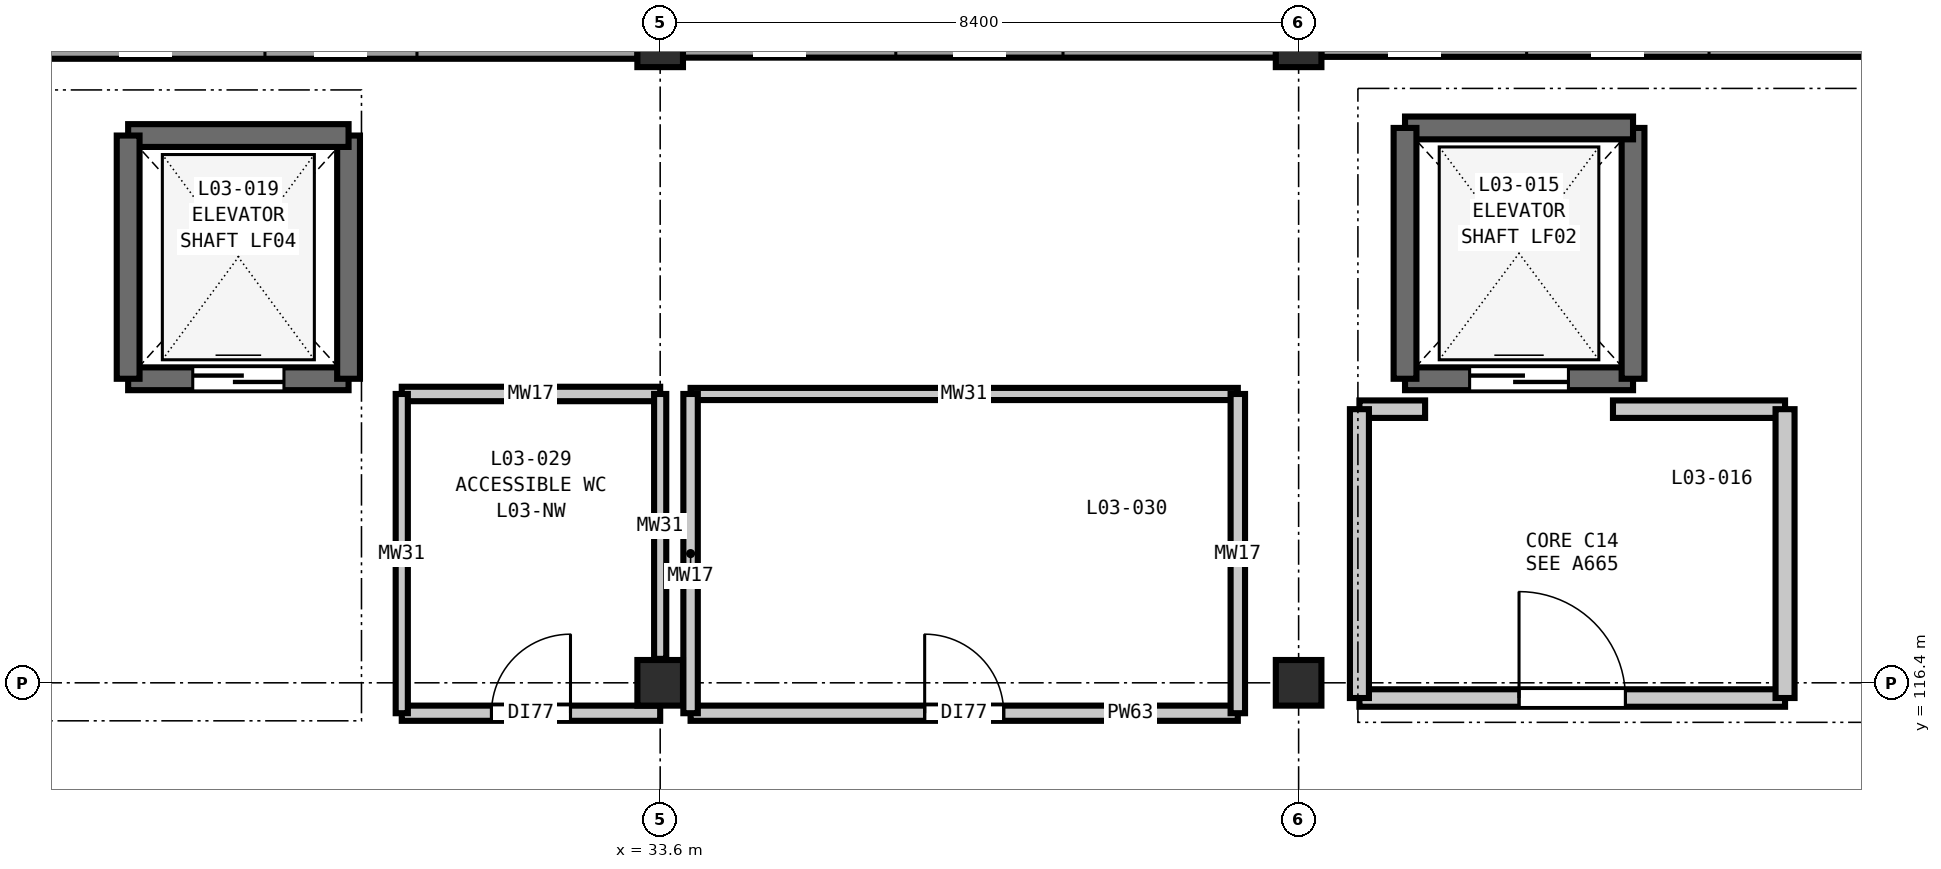
"""IFC4 building model, lengths in metres.
Left out: names, types, materials, properties, quantities, classifications, styles, units other than length and angle.
Written with IfcOpenShell. Run it as: python <this file> out.ifc"""

import sys

from ifc_helpers import new_model, si_unit, direction, frame, frame_2d, origin, origin_2d, place, context, subcontext, project, spatial, rectangle, extrude, element, fill, save


model = new_model("IFC4")
c1 = context("Model", 3, precision=1e-05, world=origin(), true_north=direction((0.0, 1.0)))
c2 = subcontext(c1, "Body", "Model", "MODEL_VIEW")
j1 = project(units=[si_unit("LENGTHUNIT", "METRE"), si_unit("PLANEANGLEUNIT", "RADIAN")], contexts=[c1])
p1 = place(None, origin())
s1 = spatial("IfcSite", under=j1, at=p1, CompositionType="ELEMENT")
p2 = place(p1, origin())
s2 = spatial("IfcBuilding", under=s1, at=p2, CompositionType="ELEMENT")
p3 = place(p2, frame((0.0, 0.0, 16.2)))
s3 = spatial("IfcBuildingStorey", under=s2, at=p3, CompositionType="ELEMENT", Elevation=16.2)
for number, where, z_axis, x_axis in (
    (1, (33.6, 116.4, 0.0), (0.0, 0.0, 1.0), (1.0, 0.0, 0.0)),
    (2, (33.6, 124.8, 0.0), (0.0, 0.0, 1.0), (1.0, 0.0, 0.0)),
    (3, (42.0, 116.4, 0.0), (0.0, 0.0, 1.0), (1.0, 0.0, 0.0)),
    (4, (42.0, 124.8, 0.0), (0.0, 0.0, 1.0), (1.0, 0.0, 0.0)),
):
    element("IfcColumn", number, at=place(p3, frame(where, z_axis=z_axis, x_axis=x_axis)), inside=s3, PredefinedType="COLUMN", context=c2, shape_type="SweptSolid", body=[
        extrude(rectangle(XDim=0.6, YDim=0.6, at=origin_2d()), origin(), (0.0, 0.0, 1.0), 4.2),
    ])
p4 = place(p3, frame((25.498, 124.8, 0.0), z_axis=(0.0, 0.0, 1.0), x_axis=(1.0, 0.0, 0.0)))
e5 = element("IfcWall", 5, at=p4, inside=s3, PredefinedType="SOLIDWALL", context=c2, shape_type="SweptSolid", body=[
    extrude(rectangle(XDim=7.804, YDim=0.38, at=frame_2d((3.902, 0.0))), origin(), (0.0, 0.0, 1.0), 3.48),
])
p5 = place(p4, frame((2.902, 0.0, 0.9)))
e6 = element("IfcOpeningElement", 6, at=p5, cuts=e5, PredefinedType="OPENING", context=c2, shape_type="SweptSolid", body=[
    extrude(rectangle(XDim=2.0, YDim=1.95, at=frame_2d((1.0, 0.975))), frame((0.0, 0.2, 0.0), z_axis=(0.0, -1.0, 0.0), x_axis=(1.0, 0.0, 0.0)), (0.0, 0.0, 1.0), 0.4),
])
p6 = place(p3, frame((33.898, 124.8, 0.0), z_axis=(0.0, 0.0, 1.0), x_axis=(1.0, 0.0, 0.0)))
e7 = element("IfcWall", 7, at=p6, inside=s3, PredefinedType="SOLIDWALL", context=c2, shape_type="SweptSolid", body=[
    extrude(rectangle(XDim=7.804, YDim=0.35, at=frame_2d((3.902, 0.0))), origin(), (0.0, 0.0, 1.0), 3.48),
])
p7 = place(p6, frame((2.802, 0.0, 0.9)))
e8 = element("IfcOpeningElement", 8, at=p7, cuts=e7, PredefinedType="OPENING", context=c2, shape_type="SweptSolid", body=[
    extrude(rectangle(XDim=2.2, YDim=1.95, at=frame_2d((1.1, 0.975))), frame((0.0, 0.185, 0.0), z_axis=(0.0, -1.0, 0.0), x_axis=(1.0, 0.0, 0.0)), (0.0, 0.0, 1.0), 0.37),
])
p8 = place(p3, frame((42.298, 124.8, 0.0), z_axis=(0.0, 0.0, 1.0), x_axis=(1.0, 0.0, 0.0)))
e9 = element("IfcWall", 9, at=p8, inside=s3, PredefinedType="SOLIDWALL", context=c2, shape_type="SweptSolid", body=[
    extrude(rectangle(XDim=7.804, YDim=0.33, at=frame_2d((3.902, 0.0))), origin(), (0.0, 0.0, 1.0), 3.48),
])
p9 = place(p8, frame((2.702, 0.0, 0.9)))
e10 = element("IfcOpeningElement", 10, at=p9, cuts=e9, PredefinedType="OPENING", context=c2, shape_type="SweptSolid", body=[
    extrude(rectangle(XDim=2.4, YDim=1.95, at=frame_2d((1.2, 0.975))), frame((0.0, 0.175, 0.0), z_axis=(0.0, -1.0, 0.0), x_axis=(1.0, 0.0, 0.0)), (0.0, 0.0, 1.0), 0.35),
])
p10 = place(p3, frame((43.4, 120.4, 0.0), z_axis=(0.0, 0.0, 1.0), x_axis=(1.0, 0.0, 0.0)))
e11 = element("IfcWall", 11, at=p10, inside=s3, PredefinedType="SHEAR", context=c2, shape_type="SweptSolid", body=[
    extrude(rectangle(XDim=3.0, YDim=0.3, at=frame_2d((1.5, 0.0))), origin(), (0.0, 0.0, 1.0), 4.2),
])
p11 = place(p10, frame((0.85, 0.0, 0.0)))
e12 = element("IfcOpeningElement", 12, at=p11, cuts=e11, PredefinedType="OPENING", context=c2, shape_type="SweptSolid", body=[
    extrude(rectangle(XDim=1.3, YDim=2.2, at=frame_2d((0.65, 1.1))), frame((0.0, 0.16, 0.0), z_axis=(0.0, -1.0, 0.0), x_axis=(1.0, 0.0, 0.0)), (0.0, 0.0, 1.0), 0.32),
])
p12 = place(p3, frame((46.4, 120.4, 0.0), z_axis=(0.0, 0.0, 1.0), x_axis=(0.0, 1.0, 0.0)))
e13 = element("IfcWall", 13, at=p12, inside=s3, PredefinedType="SHEAR", context=c2, shape_type="SweptSolid", body=[
    extrude(rectangle(XDim=3.3, YDim=0.3, at=frame_2d((1.65, 0.0))), origin(), (0.0, 0.0, 1.0), 4.2),
])
p13 = place(p3, frame((46.4, 123.7, 0.0), z_axis=(0.0, 0.0, 1.0), x_axis=(-1.0, 0.0, 0.0)))
e14 = element("IfcWall", 14, at=p13, inside=s3, PredefinedType="SHEAR", context=c2, shape_type="SweptSolid", body=[
    extrude(rectangle(XDim=3.0, YDim=0.3, at=frame_2d((1.5, 0.0))), origin(), (0.0, 0.0, 1.0), 4.2),
])
p14 = place(p3, frame((43.4, 123.7, 0.0), z_axis=(0.0, 0.0, 1.0), x_axis=(0.0, -1.0, 0.0)))
e15 = element("IfcWall", 15, at=p14, inside=s3, PredefinedType="SHEAR", context=c2, shape_type="SweptSolid", body=[
    extrude(rectangle(XDim=3.3, YDim=0.3, at=frame_2d((1.65, 0.0))), origin(), (0.0, 0.0, 1.0), 4.2),
])
p15 = place(p3, frame((26.6, 120.4, 0.0), z_axis=(0.0, 0.0, 1.0), x_axis=(1.0, 0.0, 0.0)))
e16 = element("IfcWall", 16, at=p15, inside=s3, PredefinedType="SHEAR", context=c2, shape_type="SweptSolid", body=[
    extrude(rectangle(XDim=2.9, YDim=0.3, at=frame_2d((1.45, 0.0))), origin(), (0.0, 0.0, 1.0), 4.2),
])
p16 = place(p15, frame((0.85, 0.0, 0.0)))
e17 = element("IfcOpeningElement", 17, at=p16, cuts=e16, PredefinedType="OPENING", context=c2, shape_type="SweptSolid", body=[
    extrude(rectangle(XDim=1.2, YDim=2.2, at=frame_2d((0.6, 1.1))), frame((0.0, 0.16, 0.0), z_axis=(0.0, -1.0, 0.0), x_axis=(1.0, 0.0, 0.0)), (0.0, 0.0, 1.0), 0.32),
])
p17 = place(p3, frame((29.5, 120.4, 0.0), z_axis=(0.0, 0.0, 1.0), x_axis=(0.0, 1.0, 0.0)))
e18 = element("IfcWall", 18, at=p17, inside=s3, PredefinedType="SHEAR", context=c2, shape_type="SweptSolid", body=[
    extrude(rectangle(XDim=3.2, YDim=0.3, at=frame_2d((1.6, 0.0))), origin(), (0.0, 0.0, 1.0), 4.2),
])
p18 = place(p3, frame((29.5, 123.6, 0.0), z_axis=(0.0, 0.0, 1.0), x_axis=(-1.0, 0.0, 0.0)))
e19 = element("IfcWall", 19, at=p18, inside=s3, PredefinedType="SHEAR", context=c2, shape_type="SweptSolid", body=[
    extrude(rectangle(XDim=2.9, YDim=0.3, at=frame_2d((1.45, 0.0))), origin(), (0.0, 0.0, 1.0), 4.2),
])
p19 = place(p3, frame((26.6, 123.6, 0.0), z_axis=(0.0, 0.0, 1.0), x_axis=(0.0, -1.0, 0.0)))
e20 = element("IfcWall", 20, at=p19, inside=s3, PredefinedType="SHEAR", context=c2, shape_type="SweptSolid", body=[
    extrude(rectangle(XDim=3.2, YDim=0.3, at=frame_2d((1.6, 0.0))), origin(), (0.0, 0.0, 1.0), 4.2),
])
p20 = place(p3, frame((30.2, 116.0, 0.0), z_axis=(0.0, 0.0, 1.0), x_axis=(1.0, 0.0, 0.0)))
e21 = element("IfcWall", 21, at=p20, inside=s3, PredefinedType="PARTITIONING", context=c2, shape_type="SweptSolid", body=[
    extrude(rectangle(XDim=3.4, YDim=0.2, at=frame_2d((1.7, 0.0))), origin(), (0.0, 0.0, 1.0), 3.89),
])
p21 = place(p20, frame((1.18, 0.0, 0.0)))
e22 = element("IfcOpeningElement", 22, at=p21, cuts=e21, PredefinedType="OPENING", context=c2, shape_type="SweptSolid", body=[
    extrude(rectangle(XDim=1.04, YDim=2.1, at=frame_2d((0.52, 1.05))), frame((0.0, 0.11, 0.0), z_axis=(0.0, -1.0, 0.0), x_axis=(1.0, 0.0, 0.0)), (0.0, 0.0, 1.0), 0.22),
])
p22 = place(p3, frame((34.0, 116.0, 0.0), z_axis=(0.0, 0.0, 1.0), x_axis=(1.0, 0.0, 0.0)))
e23 = element("IfcWall", 23, at=p22, inside=s3, PredefinedType="PARTITIONING", context=c2, shape_type="SweptSolid", body=[
    extrude(rectangle(XDim=7.2, YDim=0.2, at=frame_2d((3.6, 0.0))), origin(), (0.0, 0.0, 1.0), 3.89),
])
p23 = place(p22, frame((3.08, 0.0, 0.0)))
e24 = element("IfcOpeningElement", 24, at=p23, cuts=e23, PredefinedType="OPENING", context=c2, shape_type="SweptSolid", body=[
    extrude(rectangle(XDim=1.04, YDim=2.1, at=frame_2d((0.52, 1.05))), frame((0.0, 0.11, 0.0), z_axis=(0.0, -1.0, 0.0), x_axis=(1.0, 0.0, 0.0)), (0.0, 0.0, 1.0), 0.22),
])
p24 = place(p3, frame((42.8, 116.2, 0.0), z_axis=(0.0, 0.0, 1.0), x_axis=(1.0, 0.0, 0.0)))
e25 = element("IfcWall", 25, at=p24, inside=s3, PredefinedType="PARTITIONING", context=c2, shape_type="SweptSolid", body=[
    extrude(rectangle(XDim=5.6, YDim=0.23, at=frame_2d((2.8, 0.0))), origin(), (0.0, 0.0, 1.0), 3.535),
])
p25 = place(p24, frame((2.1, 0.0, 0.0)))
e26 = element("IfcOpeningElement", 26, at=p25, cuts=e25, PredefinedType="OPENING", context=c2, shape_type="SweptSolid", body=[
    extrude(rectangle(XDim=1.4, YDim=2.2, at=frame_2d((0.7, 1.1))), frame((0.0, 0.125, 0.0), z_axis=(0.0, -1.0, 0.0), x_axis=(1.0, 0.0, 0.0)), (0.0, 0.0, 1.0), 0.25),
])
p26 = place(p3, frame((46.136, 120.0, 0.0), z_axis=(0.0, 0.0, 1.0), x_axis=(1.0, 0.0, 0.0)))
e27 = element("IfcWall", 27, at=p26, inside=s3, PredefinedType="PARTITIONING", context=c2, shape_type="SweptSolid", body=[
    extrude(rectangle(XDim=2.264, YDim=0.23, at=frame_2d((1.132, 0.0))), origin(), (0.0, 0.0, 1.0), 3.89),
])
p27 = place(p3, frame((42.8, 120.0, 0.0), z_axis=(0.0, 0.0, 1.0), x_axis=(1.0, 0.0, 0.0)))
e28 = element("IfcWall", 28, at=p27, inside=s3, PredefinedType="PARTITIONING", context=c2, shape_type="SweptSolid", body=[
    extrude(rectangle(XDim=0.864, YDim=0.23, at=frame_2d((0.432, 0.0))), origin(), (0.0, 0.0, 1.0), 3.89),
])
p28 = place(p3, frame((30.2, 120.2, 0.0), z_axis=(0.0, 0.0, 1.0), x_axis=(1.0, 0.0, 0.0)))
e29 = element("IfcWall", 29, at=p28, inside=s3, PredefinedType="PLUMBINGWALL", context=c2, shape_type="SweptSolid", body=[
    extrude(rectangle(XDim=3.4, YDim=0.19, at=frame_2d((1.7, 0.0))), origin(), (0.0, 0.0, 1.0), 3.89),
])
p29 = place(p3, frame((34.0, 120.2, 0.0), z_axis=(0.0, 0.0, 1.0), x_axis=(1.0, 0.0, 0.0)))
e30 = element("IfcWall", 30, at=p29, inside=s3, PredefinedType="PLUMBINGWALL", context=c2, shape_type="SweptSolid", body=[
    extrude(rectangle(XDim=7.2, YDim=0.16, at=frame_2d((3.6, 0.0))), origin(), (0.0, 0.0, 1.0), 3.89),
])
p30 = place(p3, frame((30.2, 116.0, 0.0), z_axis=(0.0, 0.0, 1.0), x_axis=(0.0, 1.0, 0.0)))
e31 = element("IfcWall", 31, at=p30, inside=s3, PredefinedType="PLUMBINGWALL", context=c2, shape_type="SweptSolid", body=[
    extrude(rectangle(XDim=4.2, YDim=0.16, at=frame_2d((2.1, 0.0))), origin(), (0.0, 0.0, 1.0), 3.89),
])
p31 = place(p3, frame((33.6, 116.715, 0.0), z_axis=(0.0, 0.0, 1.0), x_axis=(0.0, 1.0, 0.0)))
e32 = element("IfcWall", 32, at=p31, inside=s3, PredefinedType="PLUMBINGWALL", context=c2, shape_type="SweptSolid", body=[
    extrude(rectangle(XDim=3.485, YDim=0.16, at=frame_2d((1.742, 0.0))), origin(), (0.0, 0.0, 1.0), 3.585),
])
for number, where, z_axis, x_axis in (
    (33, (34.0, 116.0, 0.0), (0.0, 0.0, 1.0), (0.0, 1.0, 0.0)),
    (34, (41.2, 116.0, 0.0), (0.0, 0.0, 1.0), (0.0, 1.0, 0.0)),
):
    element("IfcWall", number, at=place(p3, frame(where, z_axis=z_axis, x_axis=x_axis)), inside=s3, PredefinedType="PLUMBINGWALL", context=c2, shape_type="SweptSolid", body=[
        extrude(rectangle(XDim=4.2, YDim=0.19, at=frame_2d((2.1, 0.0))), origin(), (0.0, 0.0, 1.0), 3.89),
    ])
for number, where, z_axis, x_axis in (
    (35, (42.8, 116.2, 0.0), (0.0, 0.0, 1.0), (0.0, 1.0, 0.0)),
    (36, (48.4, 116.2, 0.0), (0.0, 0.0, 1.0), (0.0, 1.0, 0.0)),
):
    element("IfcWall", number, at=place(p3, frame(where, z_axis=z_axis, x_axis=x_axis)), inside=s3, PredefinedType="PARTITIONING", context=c2, shape_type="SweptSolid", body=[
        extrude(rectangle(XDim=3.8, YDim=0.25, at=frame_2d((1.9, 0.0))), origin(), (0.0, 0.0, 1.0), 3.89),
    ])
p32 = place(p11, origin())
e37 = element("IfcDoor", 37, at=p32, inside=s3, OperationType="DOUBLE_DOOR_SLIDING", PredefinedType="DOOR", context=c2, shape_type="SweptSolid", body=[
    extrude(rectangle(XDim=1.3, YDim=2.2, at=frame_2d((0.65, 1.1))), frame((0.0, 0.025, 0.0), z_axis=(0.0, -1.0, 0.0), x_axis=(1.0, 0.0, 0.0)), (0.0, 0.0, 1.0), 0.05),
])
fill(e12, e37)
p33 = place(p16, origin())
e38 = element("IfcDoor", 38, at=p33, inside=s3, OperationType="DOUBLE_DOOR_SLIDING", PredefinedType="DOOR", context=c2, shape_type="SweptSolid", body=[
    extrude(rectangle(XDim=1.2, YDim=2.2, at=frame_2d((0.6, 1.1))), frame((0.0, 0.025, 0.0), z_axis=(0.0, -1.0, 0.0), x_axis=(1.0, 0.0, 0.0)), (0.0, 0.0, 1.0), 0.05),
])
fill(e17, e38)
p34 = place(p21, origin())
e39 = element("IfcDoor", 39, at=p34, inside=s3, OperationType="SINGLE_SWING_RIGHT", PredefinedType="DOOR", context=c2, shape_type="SweptSolid", body=[
    extrude(rectangle(XDim=1.04, YDim=2.1, at=frame_2d((0.52, 1.05))), frame((0.0, 0.025, 0.0), z_axis=(0.0, -1.0, 0.0), x_axis=(1.0, 0.0, 0.0)), (0.0, 0.0, 1.0), 0.05),
])
fill(e22, e39)
p35 = place(p23, origin())
e40 = element("IfcDoor", 40, at=p35, inside=s3, OperationType="SINGLE_SWING_LEFT", PredefinedType="DOOR", context=c2, shape_type="SweptSolid", body=[
    extrude(rectangle(XDim=1.04, YDim=2.1, at=frame_2d((0.52, 1.05))), frame((0.0, 0.025, 0.0), z_axis=(0.0, -1.0, 0.0), x_axis=(1.0, 0.0, 0.0)), (0.0, 0.0, 1.0), 0.05),
])
fill(e24, e40)
p36 = place(p25, origin())
e41 = element("IfcDoor", 41, at=p36, inside=s3, OperationType="SINGLE_SWING_LEFT", PredefinedType="DOOR", context=c2, shape_type="SweptSolid", body=[
    extrude(rectangle(XDim=1.4, YDim=2.2, at=frame_2d((0.7, 1.1))), frame((0.0, 0.025, 0.0), z_axis=(0.0, -1.0, 0.0), x_axis=(1.0, 0.0, 0.0)), (0.0, 0.0, 1.0), 0.05),
])
fill(e26, e41)
save(model, sys.argv[1])
